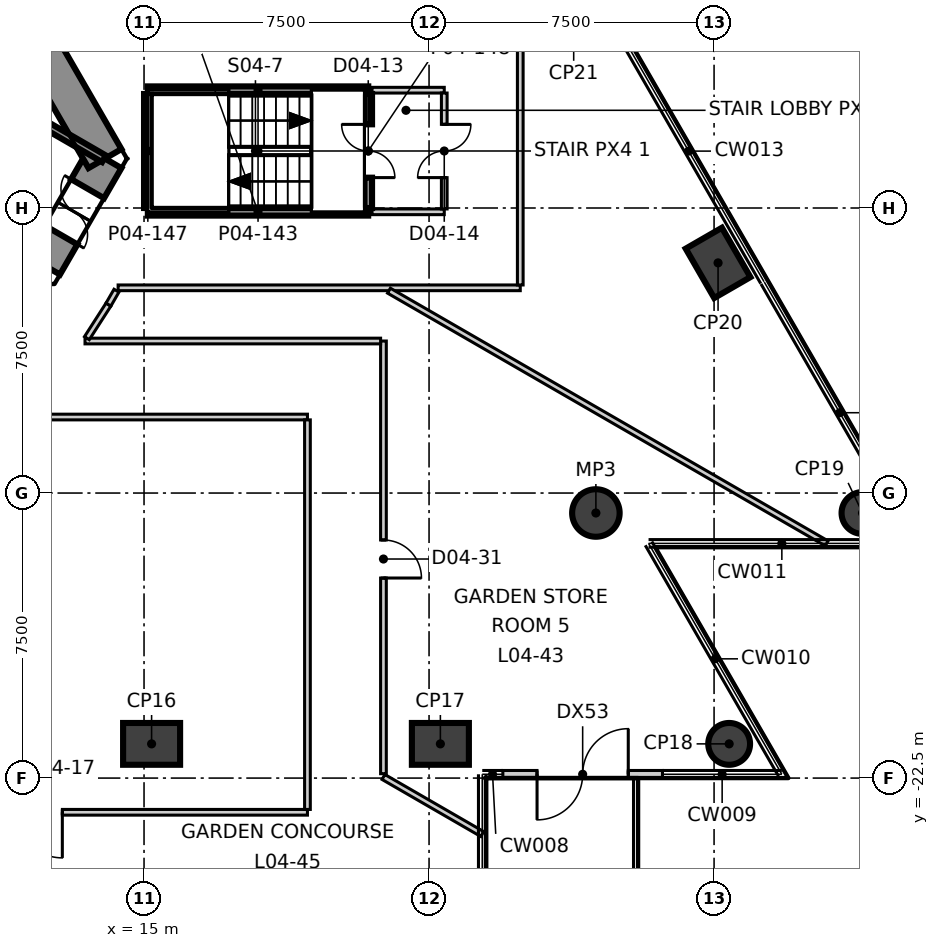
"""IFC4 building model, lengths in metres.
Left out: names, types, materials, properties, quantities, classifications, styles, units other than length and angle.
Written with IfcOpenShell. Run it as: python <this file> out.ifc"""

import sys

from ifc_helpers import new_model, si_unit, direction, frame, frame_2d, origin, origin_2d, place, context, subcontext, project, spatial, polyline, rectangle, circle, outline, extrude, element, fill, save


model = new_model("IFC4")
c1 = context("Model", 3, precision=1e-05, world=origin(), true_north=direction((0.0, 1.0)))
c2 = subcontext(c1, "Body", "Model", "MODEL_VIEW")
j1 = project(units=[si_unit("LENGTHUNIT", "METRE"), si_unit("PLANEANGLEUNIT", "RADIAN")], contexts=[c1])
p1 = place(None, origin())
s1 = spatial("IfcSite", under=j1, at=p1, CompositionType="ELEMENT")
p2 = place(p1, origin())
s2 = spatial("IfcBuilding", under=s1, at=p2, CompositionType="ELEMENT")
p3 = place(p2, frame((0.0, 0.0, 25.3)))
s3 = spatial("IfcBuildingStorey", under=s2, at=p3, CompositionType="ELEMENT", Elevation=25.3)
p4 = place(p3, frame((-12.355, -9.0, -0.4), z_axis=(0.0, 0.0, 1.0), x_axis=(1.0, 0.0, 0.0)))
e1 = element("IfcWall", 1, at=p4, inside=s3, PredefinedType="SHEAR", context=c2, shape_type="SweptSolid", body=[
    extrude(outline(polyline([(-0.289, -0.5), (1.656, -0.5), (3.601, -0.5), (5.547, -0.5), (7.492, -0.5), (9.437, -0.5), (11.382, -0.5), (13.328, -0.5), (15.273, -0.5), (17.218, -0.5), (19.163, -0.5), (21.109, -0.5), (23.054, -0.5), (24.999, -0.5), (24.422, 0.5), (22.566, 0.5), (20.709, 0.5), (18.853, 0.5), (16.996, 0.5), (15.14, 0.5), (13.283, 0.5), (11.427, 0.5), (9.57, 0.5), (7.714, 0.5), (5.857, 0.5), (4.001, 0.5), (2.145, 0.5), (0.288, 0.5), (-0.289, -0.5)])), origin(), (0.0, 0.0, 1.0), 5.0),
])
p5 = place(p3, frame((12.355, -9.0, -0.4), z_axis=(0.0, 0.0, 1.0), x_axis=(0.500077567175, 0.865980615723, 0.0)))
e2 = element("IfcWall", 2, at=p5, inside=s3, PredefinedType="SHEAR", context=c2, shape_type="SweptSolid", body=[
    extrude(outline(polyline([(-0.288, -0.5), (1.617, -0.5), (3.522, -0.5), (2.945, 0.5), (1.617, 0.5), (0.289, 0.499), (-0.288, -0.5)])), origin(), (0.0, 0.0, 1.0), 5.0),
])
p6 = place(p5, frame((0.917, 0.0, 0.4)))
e3 = element("IfcOpeningElement", 3, at=p6, cuts=e2, PredefinedType="OPENING", context=c2, shape_type="SweptSolid", body=[
    extrude(rectangle(XDim=1.4, YDim=2.1, at=frame_2d((0.7, 1.05))), frame((0.0, 0.51, 0.0), z_axis=(0.0, -1.0, 0.0), x_axis=(1.0, 0.0, 0.0)), (0.0, 0.0, 1.0), 1.02),
])
p7 = place(p3, frame((13.972, -6.2, -0.4), z_axis=(0.0, 0.0, 1.0), x_axis=(-0.499992141631, 0.866029940768, 0.0)))
e4 = element("IfcWall", 4, at=p7, inside=s3, PredefinedType="SHEAR", context=c2, shape_type="SweptSolid", body=[
    extrude(outline(polyline([(-0.288, -0.5), (1.657, -0.5), (3.602, -0.5), (5.547, -0.5), (7.493, -0.5), (9.438, -0.5), (11.383, -0.5), (13.328, -0.5), (15.273, -0.5), (17.218, -0.499), (19.164, -0.499), (21.109, -0.499), (23.054, -0.499), (24.999, -0.499), (24.422, 0.5), (22.566, 0.5), (20.709, 0.5), (18.853, 0.5), (16.996, 0.5), (15.14, 0.5), (13.283, 0.5), (11.427, 0.5), (9.57, 0.5), (7.714, 0.5), (5.857, 0.5), (4.001, 0.5), (2.145, 0.5), (0.288, 0.5), (-0.288, -0.5)])), origin(), (0.0, 0.0, 1.0), 5.0),
])
p8 = place(p7, frame((11.455, 0.0, 0.4)))
e5 = element("IfcOpeningElement", 5, at=p8, cuts=e4, PredefinedType="OPENING", context=c2, shape_type="SweptSolid", body=[
    extrude(rectangle(XDim=1.8, YDim=2.1, at=frame_2d((0.9, 1.05))), frame((0.0, 0.51, 0.0), z_axis=(0.0, -1.0, 0.0), x_axis=(1.0, 0.0, 0.0)), (0.0, 0.0, 1.0), 1.02),
])
for number, where, z_axis, x_axis in (
    (6, (15.199, -21.6, -0.4), (0.0, 0.0, 1.0), (1.0, 0.0, 0.0)),
    (7, (22.798, -21.6, -0.4), (0.0, 0.0, 1.0), (1.0, 0.0, 0.0)),
):
    element("IfcColumn", number, at=place(p3, frame(where, z_axis=z_axis, x_axis=x_axis)), inside=s3, PredefinedType="COLUMN", context=c2, shape_type="SweptSolid", body=[
        extrude(rectangle(XDim=1.5, YDim=1.1, at=origin_2d()), origin(), (0.0, 0.0, 1.0), 5.0),
    ])
for number, where, z_axis, x_axis in (
    (8, (30.397, -21.6, -0.4), (0.0, 0.0, 1.0), (1.0, 0.0, 0.0)),
    (9, (33.905, -15.525, -0.4), (0.0, 0.0, 1.0), (-0.5, 0.866, 0.0)),
):
    element("IfcColumn", number, at=place(p3, frame(where, z_axis=z_axis, x_axis=x_axis)), inside=s3, PredefinedType="COLUMN", context=c2, shape_type="SweptSolid", body=[
        extrude(circle(Radius=0.55, at=origin_2d()), origin(), (0.0, 0.0, 1.0), 5.0),
    ])
p9 = place(p3, frame((30.105, -8.944, -0.4), z_axis=(0.0, 0.0, 1.0), x_axis=(-0.5, 0.866025403784, 0.0)))
e10 = element("IfcColumn", 10, at=p9, inside=s3, PredefinedType="COLUMN", context=c2, shape_type="SweptSolid", body=[
    extrude(rectangle(XDim=1.5, YDim=1.1, at=origin_2d()), origin(), (0.0, 0.0, 1.0), 5.0),
])
p10 = place(p3, frame((26.89, -15.525, -0.4), z_axis=(0.0, 0.0, 1.0), x_axis=(1.0, 0.0, 0.0)))
e11 = element("IfcColumn", 11, at=p10, inside=s3, PredefinedType="COLUMN", context=c2, shape_type="SweptSolid", body=[
    extrude(circle(Radius=0.625, at=origin_2d()), origin(), (0.0, 0.0, 1.0), 5.0),
])
p11 = place(p3, frame((24.442, -22.4, 0.0), z_axis=(0.0, 0.0, 1.0), x_axis=(1.0, 0.0, 0.0)))
e12 = element("IfcWall", 12, at=p11, inside=s3, PredefinedType="ELEMENTEDWALL", context=c2, shape_type="SweptSolid", body=[
    extrude(rectangle(XDim=4.2, YDim=0.2, at=frame_2d((2.1, 0.0))), origin(), (0.0, 0.0, 1.0), 4.6),
])
p12 = place(p11, frame((0.9, 0.0, 0.0)))
e13 = element("IfcOpeningElement", 13, at=p12, cuts=e12, PredefinedType="OPENING", context=c2, shape_type="SweptSolid", body=[
    extrude(rectangle(XDim=2.4, YDim=2.4, at=frame_2d((1.2, 1.2))), frame((0.0, 0.11, 0.0), z_axis=(0.0, -1.0, 0.0), x_axis=(1.0, 0.0, 0.0)), (0.0, 0.0, 1.0), 0.22),
])
for number, where, z_axis, x_axis in (
    (14, (21.0, -7.6, 0.0), (0.0, 0.0, 1.0), (1.0, 0.0, 0.0)),
    (15, (21.0, -4.4, 0.0), (0.0, 0.0, 1.0), (1.0, 0.0, 0.0)),
):
    element("IfcWall", number, at=place(p3, frame(where, z_axis=z_axis, x_axis=x_axis)), inside=s3, PredefinedType="PARTITIONING", context=c2, shape_type="SweptSolid", body=[
        extrude(rectangle(XDim=1.9, YDim=0.15, at=frame_2d((0.95, 0.0))), origin(), (0.0, 0.0, 1.0), 4.6),
    ])
p13 = place(p3, frame((22.9, -7.525, 0.0), z_axis=(0.0, 0.0, 1.0), x_axis=(0.0, 1.0, 0.0)))
e16 = element("IfcWall", 16, at=p13, inside=s3, PredefinedType="PARTITIONING", context=c2, shape_type="SweptSolid", body=[
    extrude(rectangle(XDim=3.05, YDim=0.15, at=frame_2d((1.525, 0.0))), origin(), (0.0, 0.0, 1.0), 4.6),
])
p14 = place(p13, frame((0.825, 0.0, 0.0)))
e17 = element("IfcOpeningElement", 17, at=p14, cuts=e16, PredefinedType="OPENING", context=c2, shape_type="SweptSolid", body=[
    extrude(rectangle(XDim=1.4, YDim=2.1, at=frame_2d((0.7, 1.05))), frame((0.0, 0.085, 0.0), z_axis=(0.0, -1.0, 0.0), x_axis=(1.0, 0.0, 0.0)), (0.0, 0.0, 1.0), 0.17),
])
p15 = place(p3, frame((14.318, -9.6, 0.0), z_axis=(0.0, 0.0, 1.0), x_axis=(1.0, 0.0, 0.0)))
e18 = element("IfcWall", 18, at=p15, inside=s3, PredefinedType="PARTITIONING", context=c2, shape_type="SweptSolid", body=[
    extrude(rectangle(XDim=10.582, YDim=0.15, at=frame_2d((5.291, 0.0))), origin(), (0.0, 0.0, 1.0), 4.6),
])
p16 = place(p3, frame((4.0, -13.0, 0.0), z_axis=(0.0, 0.0, 1.0), x_axis=(1.0, 0.0, 0.0)))
e19 = element("IfcWall", 19, at=p16, inside=s3, PredefinedType="PARTITIONING", context=c2, shape_type="SweptSolid", body=[
    extrude(rectangle(XDim=15.3, YDim=0.15, at=frame_2d((7.65, 0.0))), origin(), (0.0, 0.0, 1.0), 4.6),
])
p17 = place(p3, frame((4.0, -23.4, 0.0), z_axis=(0.0, 0.0, 1.0), x_axis=(1.0, 0.0, 0.0)))
e20 = element("IfcWall", 20, at=p17, inside=s3, PredefinedType="PARTITIONING", context=c2, shape_type="SweptSolid", body=[
    extrude(rectangle(XDim=15.3, YDim=0.15, at=frame_2d((7.65, 0.0))), origin(), (0.0, 0.0, 1.0), 4.6),
])
p18 = place(p17, frame((6.45, 0.0, 0.0)))
e21 = element("IfcOpeningElement", 21, at=p18, cuts=e20, PredefinedType="OPENING", context=c2, shape_type="SweptSolid", body=[
    extrude(rectangle(XDim=2.4, YDim=2.1, at=frame_2d((1.2, 1.05))), frame((0.0, 0.085, 0.0), z_axis=(0.0, -1.0, 0.0), x_axis=(1.0, 0.0, 0.0)), (0.0, 0.0, 1.0), 0.17),
])
p19 = place(p3, frame((24.9, -9.525, 0.0), z_axis=(0.0, 0.0, 1.0), x_axis=(0.0, 1.0, 0.0)))
e22 = element("IfcWall", 22, at=p19, inside=s3, PredefinedType="PARTITIONING", context=c2, shape_type="SweptSolid", body=[
    extrude(rectangle(XDim=7.05, YDim=0.15, at=frame_2d((3.525, 0.0))), origin(), (0.0, 0.0, 1.0), 4.6),
])
p20 = place(p3, frame((21.3, -22.471, 0.0), z_axis=(0.0, 0.0, 1.0), x_axis=(0.86589168432, -0.500231537416, 0.0)))
e23 = element("IfcWall", 23, at=p20, inside=s3, PredefinedType="PARTITIONING", context=c2, shape_type="SweptSolid", body=[
    extrude(rectangle(XDim=3.002, YDim=0.15, at=frame_2d((1.501, 0.0))), origin(), (0.0, 0.0, 1.0), 4.6),
])
p21 = place(p3, frame((21.3, -22.385, 0.0), z_axis=(0.0, 0.0, 1.0), x_axis=(0.0, 1.0, 0.0)))
e24 = element("IfcWall", 24, at=p21, inside=s3, PredefinedType="PARTITIONING", context=c2, shape_type="SweptSolid", body=[
    extrude(rectangle(XDim=11.385, YDim=0.15, at=frame_2d((5.692, 0.0))), origin(), (0.0, 0.0, 1.0), 4.6),
])
p22 = place(p21, frame((5.149, 0.0, 0.0)))
e25 = element("IfcOpeningElement", 25, at=p22, cuts=e24, PredefinedType="OPENING", context=c2, shape_type="SweptSolid", body=[
    extrude(rectangle(XDim=1.0, YDim=2.1, at=frame_2d((0.5, 1.05))), frame((0.0, 0.085, 0.0), z_axis=(0.0, -1.0, 0.0), x_axis=(1.0, 0.0, 0.0)), (0.0, 0.0, 1.0), 0.17),
])
p23 = place(p3, frame((13.447, -11.0, 0.0), z_axis=(0.0, 0.0, 1.0), x_axis=(1.0, 0.0, 0.0)))
e26 = element("IfcWall", 26, at=p23, inside=s3, PredefinedType="PARTITIONING", context=c2, shape_type="SweptSolid", body=[
    extrude(rectangle(XDim=7.778, YDim=0.15, at=frame_2d((3.889, 0.0))), origin(), (0.0, 0.0, 1.0), 4.6),
])
p24 = place(p3, frame((13.496, -10.925, 0.0), z_axis=(0.0, 0.0, 1.0), x_axis=(0.540463965639, 0.841367162329, 0.0)))
e27 = element("IfcWall", 27, at=p24, inside=s3, PredefinedType="PARTITIONING", context=c2, shape_type="SweptSolid", body=[
    extrude(rectangle(XDim=1.051, YDim=0.15, at=frame_2d((0.525, 0.0))), origin(), (0.0, 0.0, 1.0), 4.6),
])
p25 = place(p3, frame((14.064, -10.041, 0.0), z_axis=(0.0, 0.0, 1.0), x_axis=(0.499372162398, 0.86638758268, 0.0)))
e28 = element("IfcWall", 28, at=p25, inside=s3, PredefinedType="PARTITIONING", context=c2, shape_type="SweptSolid", body=[
    extrude(rectangle(XDim=0.422, YDim=0.15, at=frame_2d((0.211, 0.0))), origin(), (0.0, 0.0, 1.0), 4.6),
])
p26 = place(p3, frame((21.445, -9.675, 0.0), z_axis=(0.0, 0.0, 1.0), x_axis=(0.866022650714, -0.500004768428, 0.0)))
e29 = element("IfcWall", 29, at=p26, inside=s3, PredefinedType="PARTITIONING", context=c2, shape_type="SweptSolid", body=[
    extrude(rectangle(XDim=13.3, YDim=0.15, at=frame_2d((6.65, 0.0))), origin(), (0.0, 0.0, 1.0), 3.8),
])
p27 = place(p3, frame((19.3, -23.325, 0.0), z_axis=(0.0, 0.0, 1.0), x_axis=(0.0, 1.0, 0.0)))
e30 = element("IfcWall", 30, at=p27, inside=s3, PredefinedType="PARTITIONING", context=c2, shape_type="SweptSolid", body=[
    extrude(rectangle(XDim=10.25, YDim=0.15, at=frame_2d((5.125, 0.0))), origin(), (0.0, 0.0, 1.0), 4.6),
])
p28 = place(p3, frame((6.529, -1.922, 0.0), z_axis=(0.0, 0.0, 1.0), x_axis=(0.866036527536, -0.499980732602, 0.0)))
e31 = element("IfcWall", 31, at=p28, inside=s3, PredefinedType="SOLIDWALL", context=c2, shape_type="SweptSolid", body=[
    extrude(rectangle(XDim=8.564, YDim=0.2, at=frame_2d((4.282, 0.0))), origin(), (0.0, 0.0, 1.0), 4.6),
])
p29 = place(p3, frame((15.1, -4.4, 0.0), z_axis=(0.0, 0.0, 1.0), x_axis=(1.0, 0.0, 0.0)))
e32 = element("IfcWall", 32, at=p29, inside=s3, PredefinedType="SOLIDWALL", context=c2, shape_type="SweptSolid", body=[
    extrude(rectangle(XDim=5.8, YDim=0.2, at=frame_2d((2.9, 0.0))), origin(), (0.0, 0.0, 1.0), 4.6),
])
p30 = place(p3, frame((15.1, -7.6, 0.0), z_axis=(0.0, 0.0, 1.0), x_axis=(1.0, 0.0, 0.0)))
e33 = element("IfcWall", 33, at=p30, inside=s3, PredefinedType="SOLIDWALL", context=c2, shape_type="SweptSolid", body=[
    extrude(rectangle(XDim=5.798, YDim=0.2, at=frame_2d((2.899, 0.0))), origin(), (0.0, 0.0, 1.0), 4.6),
])
p31 = place(p3, frame((15.1, -7.5, 0.0), z_axis=(0.0, 0.0, 1.0), x_axis=(0.0, 1.0, 0.0)))
e34 = element("IfcWall", 34, at=p31, inside=s3, PredefinedType="SOLIDWALL", context=c2, shape_type="SweptSolid", body=[
    extrude(rectangle(XDim=3.0, YDim=0.2, at=frame_2d((1.5, 0.0))), origin(), (0.0, 0.0, 1.0), 4.6),
])
p32 = place(p3, frame((20.9, -7.5, 0.0), z_axis=(0.0, 0.0, 1.0), x_axis=(0.0, 1.0, 0.0)))
e35 = element("IfcWall", 35, at=p32, inside=s3, PredefinedType="SOLIDWALL", context=c2, shape_type="SweptSolid", body=[
    extrude(rectangle(XDim=3.0, YDim=0.2, at=frame_2d((1.5, 0.0))), origin(), (0.0, 0.0, 1.0), 4.6),
])
p33 = place(p32, frame((0.8, 0.0, 0.0)))
e36 = element("IfcOpeningElement", 36, at=p33, cuts=e35, PredefinedType="OPENING", context=c2, shape_type="SweptSolid", body=[
    extrude(rectangle(XDim=1.4, YDim=2.1, at=frame_2d((0.7, 1.05))), frame((0.0, 0.11, 0.0), z_axis=(0.0, -1.0, 0.0), x_axis=(1.0, 0.0, 0.0)), (0.0, 0.0, 1.0), 0.22),
])
p34 = place(p12, frame((2.4, 0.0, 0.0), z_axis=(0.0, 0.0, 1.0), x_axis=(-1.0, 0.0, 0.0)))
e37 = element("IfcDoor", 37, at=p34, inside=s3, OperationType="DOUBLE_DOOR_SINGLE_SWING", PredefinedType="DOOR", context=c2, shape_type="SweptSolid", body=[
    extrude(rectangle(XDim=2.4, YDim=2.4, at=frame_2d((1.2, 1.2))), frame((0.0, 0.025, 0.0), z_axis=(0.0, -1.0, 0.0), x_axis=(1.0, 0.0, 0.0)), (0.0, 0.0, 1.0), 0.05),
])
fill(e13, e37)
p35 = place(p33, origin())
e38 = element("IfcDoor", 38, at=p35, inside=s3, OperationType="DOUBLE_DOOR_SINGLE_SWING", PredefinedType="DOOR", context=c2, shape_type="SweptSolid", body=[
    extrude(rectangle(XDim=1.4, YDim=2.1, at=frame_2d((0.7, 1.05))), frame((0.0, 0.025, 0.0), z_axis=(0.0, -1.0, 0.0), x_axis=(1.0, 0.0, 0.0)), (0.0, 0.0, 1.0), 0.05),
])
fill(e36, e38)
p36 = place(p14, origin())
e39 = element("IfcDoor", 39, at=p36, inside=s3, OperationType="DOUBLE_DOOR_SINGLE_SWING", PredefinedType="DOOR", context=c2, shape_type="SweptSolid", body=[
    extrude(rectangle(XDim=1.4, YDim=2.1, at=frame_2d((0.7, 1.05))), frame((0.0, 0.025, 0.0), z_axis=(0.0, -1.0, 0.0), x_axis=(1.0, 0.0, 0.0)), (0.0, 0.0, 1.0), 0.05),
])
fill(e17, e39)
p37 = place(p18, origin())
e40 = element("IfcDoor", 40, at=p37, inside=s3, OperationType="DOUBLE_DOOR_SINGLE_SWING", PredefinedType="DOOR", context=c2, shape_type="SweptSolid", body=[
    extrude(rectangle(XDim=2.4, YDim=2.1, at=frame_2d((1.2, 1.05))), frame((0.0, 0.025, 0.0), z_axis=(0.0, -1.0, 0.0), x_axis=(1.0, 0.0, 0.0)), (0.0, 0.0, 1.0), 0.05),
])
fill(e21, e40)
p38 = place(p22, origin())
e41 = element("IfcDoor", 41, at=p38, inside=s3, OperationType="SINGLE_SWING_LEFT", PredefinedType="DOOR", context=c2, shape_type="SweptSolid", body=[
    extrude(rectangle(XDim=1.0, YDim=2.1, at=frame_2d((0.5, 1.05))), frame((0.0, 0.025, 0.0), z_axis=(0.0, -1.0, 0.0), x_axis=(1.0, 0.0, 0.0)), (0.0, 0.0, 1.0), 0.05),
])
fill(e25, e41)
p39 = place(p6, origin())
e42 = element("IfcDoor", 42, at=p39, inside=s3, OperationType="DOUBLE_DOOR_SINGLE_SWING", PredefinedType="DOOR", context=c2, shape_type="SweptSolid", body=[
    extrude(rectangle(XDim=1.4, YDim=2.1, at=frame_2d((0.7, 1.05))), frame((0.0, 0.025, 0.0), z_axis=(0.0, -1.0, 0.0), x_axis=(1.0, 0.0, 0.0)), (0.0, 0.0, 1.0), 0.05),
])
fill(e3, e42)
save(model, sys.argv[1])
